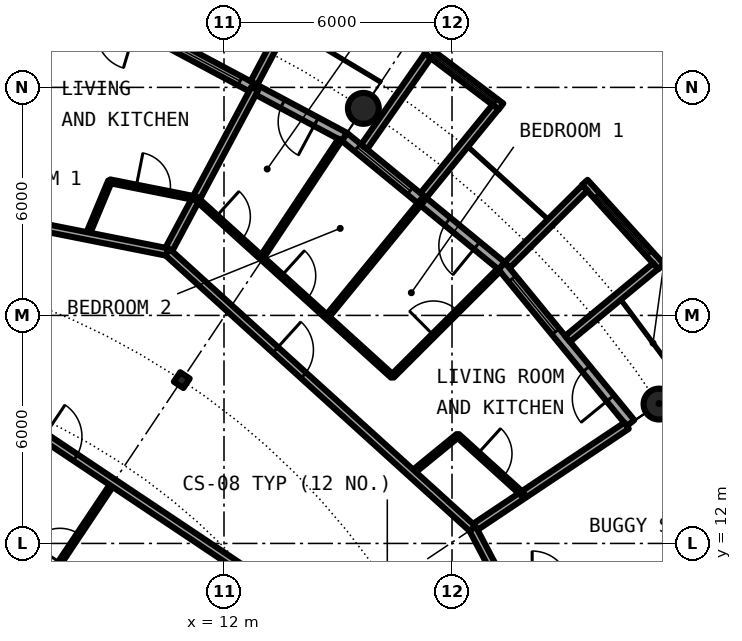
"""IFC4 building model, lengths in metres.
Left out: names, types, materials, properties, quantities, classifications, styles, units other than length and angle.
Written with IfcOpenShell. Run it as: python <this file> out.ifc"""

import sys

from ifc_helpers import new_model, si_unit, direction, frame, frame_2d, origin, origin_2d, place, context, subcontext, project, spatial, rectangle, circle, hollow_circle, i_section, extrude, element, fill, save


model = new_model("IFC4")
c1 = context("Model", 3, precision=1e-05, world=origin(), true_north=direction((0.0, 1.0)))
c2 = subcontext(c1, "Body", "Model", "MODEL_VIEW")
j1 = project(units=[si_unit("LENGTHUNIT", "METRE"), si_unit("PLANEANGLEUNIT", "RADIAN")], contexts=[c1])
p1 = place(None, origin())
s1 = spatial("IfcSite", under=j1, at=p1, CompositionType="ELEMENT")
p2 = place(p1, origin())
s2 = spatial("IfcBuilding", under=s1, at=p2, CompositionType="ELEMENT")
p3 = place(p2, frame((0.0, 0.0, 227.95)))
s3 = spatial("IfcBuildingStorey", under=s2, at=p3, CompositionType="ELEMENT", Elevation=227.95)
for number, where, z_axis, x_axis in (
    (1, (23.448, 15.667, 0.0), (0.0, 0.0, 1.0), (1.0, 0.0, 0.0)),
    (2, (15.667, 23.448, 0.0), (0.0, 0.0, 1.0), (1.0, 0.0, 0.0)),
):
    element("IfcColumn", number, at=place(p3, frame(where, z_axis=z_axis, x_axis=x_axis)), inside=s3, PredefinedType="COLUMN", context=c2, shape_type="SweptSolid", body=[
        extrude(hollow_circle(Radius=0.406, WallThickness=0.03, at=origin_2d()), origin(), (0.0, 0.0, 1.0), 3.05),
    ])
p4 = place(p3, frame((10.889, 16.297, 0.0), z_axis=(0.0, 0.0, 1.0), x_axis=(0.55557023302, 0.831469612303, 0.0)))
e3 = element("IfcColumn", 3, at=p4, inside=s3, PredefinedType="COLUMN", context=c2, shape_type="SweptSolid", body=[
    extrude(i_section(OverallWidth=0.3, OverallDepth=0.3, WebThickness=0.011, FlangeThickness=0.019, FilletRadius=0.027, at=origin_2d()), origin(), (0.0, 0.0, 1.0), 3.05),
])
p5 = place(p3, frame((22.699, 15.167, 0.0), z_axis=(0.0, 0.0, 1.0), x_axis=(-0.634382322723, 0.773019449054, 0.0)))
e4 = element("IfcWall", 4, at=p5, inside=s3, PredefinedType="SOLIDWALL", context=c2, shape_type="SweptSolid", body=[
    extrude(rectangle(XDim=5.352, YDim=0.25, at=frame_2d((2.676, 0.0))), origin(), (0.0, 0.0, 1.0), 2.7),
])
p6 = place(p5, frame((0.841, 0.0, 0.0)))
e5 = element("IfcOpeningElement", 5, at=p6, cuts=e4, PredefinedType="OPENING", context=c2, shape_type="SweptSolid", body=[
    extrude(rectangle(XDim=1.0, YDim=2.2, at=frame_2d((0.5, 1.1))), frame((0.0, 0.135, 0.0), z_axis=(0.0, -1.0, 0.0), x_axis=(1.0, 0.0, 0.0)), (0.0, 0.0, 1.0), 0.27),
])
p7 = place(p5, frame((3.111, 0.0, 0.3)))
e6 = element("IfcOpeningElement", 6, at=p7, cuts=e4, PredefinedType="OPENING", context=c2, shape_type="SweptSolid", body=[
    extrude(rectangle(XDim=1.8, YDim=2.1, at=frame_2d((0.9, 1.05))), frame((0.0, 0.135, 0.0), z_axis=(0.0, -1.0, 0.0), x_axis=(1.0, 0.0, 0.0)), (0.0, 0.0, 1.0), 0.27),
])
p8 = place(p3, frame((23.503, 19.282, -0.03), z_axis=(0.0, 0.0, 1.0), x_axis=(-0.671506829416, 0.740998365753, 0.0)))
e7 = element("IfcWall", 7, at=p8, inside=s3, PredefinedType="SOLIDWALL", context=c2, shape_type="SweptSolid", body=[
    extrude(rectangle(XDim=2.993, YDim=0.2, at=frame_2d((1.497, 0.0))), origin(), (0.0, 0.0, 1.0), 2.73),
])
p9 = place(p8, frame((0.457, 0.0, 0.33)))
e8 = element("IfcOpeningElement", 8, at=p9, cuts=e7, PredefinedType="OPENING", context=c2, shape_type="SweptSolid", body=[
    extrude(circle(Radius=1.04, at=frame_2d((1.04, 1.04))), frame((0.0, 0.11, 0.0), z_axis=(0.0, -1.0, 0.0), x_axis=(1.0, 0.0, 0.0)), (0.0, 0.0, 1.0), 0.22),
])
p10 = place(p3, frame((21.041, 17.384, -0.03), z_axis=(0.0, 0.0, 1.0), x_axis=(0.770784861449, 0.63709551667, 0.0)))
e9 = element("IfcWall", 9, at=p10, inside=s3, PredefinedType="SOLIDWALL", context=c2, shape_type="SweptSolid", body=[
    extrude(rectangle(XDim=3.006, YDim=0.2, at=frame_2d((1.503, 0.0))), origin(), (0.0, 0.0, 1.0), 2.73),
])
p11 = place(p3, frame((19.45, 19.323, -0.03), z_axis=(0.0, 0.0, 1.0), x_axis=(0.709727076896, 0.704476739375, 0.0)))
e10 = element("IfcWall", 10, at=p11, inside=s3, PredefinedType="SOLIDWALL", context=c2, shape_type="SweptSolid", body=[
    extrude(rectangle(XDim=2.883, YDim=0.2, at=frame_2d((1.441, 0.0))), origin(), (0.0, 0.0, 1.0), 2.73),
])
p12 = place(p3, frame((19.304, 19.304, 0.0), z_axis=(0.0, 0.0, 1.0), x_axis=(-0.773019449054, 0.634382322723, 0.0)))
e11 = element("IfcWall", 11, at=p12, inside=s3, PredefinedType="SOLIDWALL", context=c2, shape_type="SweptSolid", body=[
    extrude(rectangle(XDim=5.352, YDim=0.25, at=frame_2d((2.676, 0.0))), origin(), (0.0, 0.0, 1.0), 2.7),
])
p13 = place(p12, frame((0.841, 0.0, 0.0)))
e12 = element("IfcOpeningElement", 12, at=p13, cuts=e11, PredefinedType="OPENING", context=c2, shape_type="SweptSolid", body=[
    extrude(rectangle(XDim=1.0, YDim=2.2, at=frame_2d((0.5, 1.1))), frame((0.0, 0.135, 0.0), z_axis=(0.0, -1.0, 0.0), x_axis=(1.0, 0.0, 0.0)), (0.0, 0.0, 1.0), 0.27),
])
p14 = place(p12, frame((3.111, 0.0, 0.3)))
e13 = element("IfcOpeningElement", 13, at=p14, cuts=e11, PredefinedType="OPENING", context=c2, shape_type="SweptSolid", body=[
    extrude(rectangle(XDim=1.8, YDim=2.1, at=frame_2d((0.9, 1.05))), frame((0.0, 0.135, 0.0), z_axis=(0.0, -1.0, 0.0), x_axis=(1.0, 0.0, 0.0)), (0.0, 0.0, 1.0), 0.27),
])
p15 = place(p3, frame((19.289, 23.497, -0.03), z_axis=(0.0, 0.0, 1.0), x_axis=(-0.797887588059, 0.602806268067, 0.0)))
e14 = element("IfcWall", 14, at=p15, inside=s3, PredefinedType="SOLIDWALL", context=c2, shape_type="SweptSolid", body=[
    extrude(rectangle(XDim=2.447, YDim=0.2, at=frame_2d((1.223, 0.0))), origin(), (0.0, 0.0, 1.0), 2.73),
])
p16 = place(p15, frame((0.183, 0.0, 0.33)))
e15 = element("IfcOpeningElement", 15, at=p16, cuts=e14, PredefinedType="OPENING", context=c2, shape_type="SweptSolid", body=[
    extrude(circle(Radius=1.04, at=frame_2d((1.04, 1.04))), frame((0.0, 0.11, 0.0), z_axis=(0.0, -1.0, 0.0), x_axis=(1.0, 0.0, 0.0)), (0.0, 0.0, 1.0), 0.22),
])
p17 = place(p3, frame((17.246, 21.155, -0.03), z_axis=(0.0, 0.0, 1.0), x_axis=(0.631741648902, 0.775179004516, 0.0)))
e16 = element("IfcWall", 16, at=p17, inside=s3, PredefinedType="SOLIDWALL", context=c2, shape_type="SweptSolid", body=[
    extrude(rectangle(XDim=3.006, YDim=0.2, at=frame_2d((1.503, 0.0))), origin(), (0.0, 0.0, 1.0), 2.73),
])
p18 = place(p3, frame((15.688, 22.433, -0.03), z_axis=(0.0, 0.0, 1.0), x_axis=(0.573260687834, 0.819373043115, 0.0)))
e17 = element("IfcWall", 17, at=p18, inside=s3, PredefinedType="SOLIDWALL", context=c2, shape_type="SweptSolid", body=[
    extrude(rectangle(XDim=2.925, YDim=0.2, at=frame_2d((1.463, 0.0))), origin(), (0.0, 0.0, 1.0), 2.73),
])
p19 = place(p3, frame((15.167, 22.699, 0.0), z_axis=(0.0, 0.0, 1.0), x_axis=(-0.881915646801, 0.471407246368, 0.0)))
e18 = element("IfcWall", 18, at=p19, inside=s3, PredefinedType="SOLIDWALL", context=c2, shape_type="SweptSolid", body=[
    extrude(rectangle(XDim=5.352, YDim=0.25, at=frame_2d((2.676, 0.0))), origin(), (0.0, 0.0, 1.0), 2.7),
])
p20 = place(p19, frame((0.841, 0.0, 0.0)))
e19 = element("IfcOpeningElement", 19, at=p20, cuts=e18, PredefinedType="OPENING", context=c2, shape_type="SweptSolid", body=[
    extrude(rectangle(XDim=1.0, YDim=2.2, at=frame_2d((0.5, 1.1))), frame((0.0, 0.135, 0.0), z_axis=(0.0, -1.0, 0.0), x_axis=(1.0, 0.0, 0.0)), (0.0, 0.0, 1.0), 0.27),
])
p21 = place(p19, frame((3.111, 0.0, 0.3)))
e20 = element("IfcOpeningElement", 20, at=p21, cuts=e18, PredefinedType="OPENING", context=c2, shape_type="SweptSolid", body=[
    extrude(rectangle(XDim=1.8, YDim=2.1, at=frame_2d((0.9, 1.05))), frame((0.0, 0.135, 0.0), z_axis=(0.0, -1.0, 0.0), x_axis=(1.0, 0.0, 0.0)), (0.0, 0.0, 1.0), 0.27),
])
p22 = place(p3, frame((12.787, 24.113, -0.03), z_axis=(0.0, 0.0, 1.0), x_axis=(0.468365282436, 0.883534924159, 0.0)))
e21 = element("IfcWall", 21, at=p22, inside=s3, PredefinedType="SOLIDWALL", context=c2, shape_type="SweptSolid", body=[
    extrude(rectangle(XDim=3.006, YDim=0.2, at=frame_2d((1.503, 0.0))), origin(), (0.0, 0.0, 1.0), 2.73),
])
p23 = place(p3, frame((6.78, 10.147, 0.0), z_axis=(0.0, 0.0, 1.0), x_axis=(0.555528237031, 0.831497671591, 0.0)))
e22 = element("IfcWall", 22, at=p23, inside=s3, PredefinedType="PARTITIONING", context=c2, shape_type="SweptSolid", body=[
    extrude(rectangle(XDim=4.149, YDim=0.1, at=frame_2d((2.075, 0.0))), origin(), (0.0, 0.0, 1.0), 2.7),
])
p24 = place(p23, frame((1.625, 0.0, 0.0)))
e23 = element("IfcOpeningElement", 23, at=p24, cuts=e22, PredefinedType="OPENING", context=c2, shape_type="SweptSolid", body=[
    extrude(rectangle(XDim=0.9, YDim=2.3, at=frame_2d((0.45, 1.15))), frame((0.0, 0.06, 0.0), z_axis=(0.0, -1.0, 0.0), x_axis=(1.0, 0.0, 0.0)), (0.0, 0.0, 1.0), 0.12),
])
p25 = place(p3, frame((8.396, 20.088, 0.0), z_axis=(0.0, 0.0, 1.0), x_axis=(0.385469858593, 0.922720427929, 0.0)))
e24 = element("IfcWall", 24, at=p25, inside=s3, PredefinedType="PARTITIONING", context=c2, shape_type="SweptSolid", body=[
    extrude(rectangle(XDim=1.562, YDim=0.1, at=frame_2d((0.781, 0.0))), origin(), (0.0, 0.0, 1.0), 2.7),
])
p26 = place(p3, frame((10.512, 19.667, 0.0), z_axis=(0.0, 0.0, 1.0), x_axis=(0.471271812246, 0.881988026553, 0.0)))
e25 = element("IfcWall", 25, at=p26, inside=s3, PredefinedType="PARTITIONING", context=c2, shape_type="SweptSolid", body=[
    extrude(rectangle(XDim=4.874, YDim=0.2, at=frame_2d((2.437, 0.0))), origin(), (0.0, 0.0, 1.0), 2.7),
])
p27 = place(p3, frame((12.988, 19.518, 0.0), z_axis=(0.0, 0.0, 1.0), x_axis=(0.553823887887, 0.83263383381, 0.0)))
e26 = element("IfcWall", 26, at=p27, inside=s3, PredefinedType="PARTITIONING", context=c2, shape_type="SweptSolid", body=[
    extrude(rectangle(XDim=3.73, YDim=0.1, at=frame_2d((1.865, 0.0))), origin(), (0.0, 0.0, 1.0), 2.7),
])
p28 = place(p3, frame((14.709, 17.958, 0.0), z_axis=(0.0, 0.0, 1.0), x_axis=(0.633590098448, 0.773668913133, 0.0)))
e27 = element("IfcWall", 27, at=p28, inside=s3, PredefinedType="PARTITIONING", context=c2, shape_type="SweptSolid", body=[
    extrude(rectangle(XDim=3.962, YDim=0.1, at=frame_2d((1.981, 0.0))), origin(), (0.0, 0.0, 1.0), 2.7),
])
p29 = place(p3, frame((16.43, 16.398, 0.0), z_axis=(0.0, 0.0, 1.0), x_axis=(0.707722727509, 0.706490297858, 0.0)))
e28 = element("IfcWall", 28, at=p29, inside=s3, PredefinedType="PARTITIONING", context=c2, shape_type="SweptSolid", body=[
    extrude(rectangle(XDim=3.962, YDim=0.1, at=frame_2d((1.981, 0.0))), origin(), (0.0, 0.0, 1.0), 2.7),
])
p30 = place(p29, frame((1.531, 0.0, 0.0)))
e29 = element("IfcOpeningElement", 29, at=p30, cuts=e28, PredefinedType="OPENING", context=c2, shape_type="SweptSolid", body=[
    extrude(rectangle(XDim=0.9, YDim=2.3, at=frame_2d((0.45, 1.15))), frame((0.0, 0.06, 0.0), z_axis=(0.0, -1.0, 0.0), x_axis=(1.0, 0.0, 0.0)), (0.0, 0.0, 1.0), 0.12),
])
p31 = place(p3, frame((16.936, 13.845, 0.0), z_axis=(0.0, 0.0, 1.0), x_axis=(0.774283039722, 0.632839453889, 0.0)))
e30 = element("IfcWall", 30, at=p31, inside=s3, PredefinedType="PARTITIONING", context=c2, shape_type="SweptSolid", body=[
    extrude(rectangle(XDim=1.569, YDim=0.1, at=frame_2d((0.785, 0.0))), origin(), (0.0, 0.0, 1.0), 2.7),
])
p32 = place(p3, frame((18.542, 12.389, 0.0), z_axis=(0.0, 0.0, 1.0), x_axis=(0.831387096605, 0.55569370664, 0.0)))
e31 = element("IfcWall", 31, at=p32, inside=s3, PredefinedType="PARTITIONING", context=c2, shape_type="SweptSolid", body=[
    extrude(rectangle(XDim=4.875, YDim=0.2, at=frame_2d((2.438, 0.0))), origin(), (0.0, 0.0, 1.0), 2.7),
])
p33 = place(p3, frame((3.453, 17.36, 0.0), z_axis=(0.0, 0.0, 1.0), x_axis=(0.831437137577, -0.555618831806, 0.0)))
e32 = element("IfcWall", 32, at=p33, inside=s3, PredefinedType="PARTITIONING", context=c2, shape_type="SweptSolid", body=[
    extrude(rectangle(XDim=13.549, YDim=0.2, at=frame_2d((6.774, 0.0))), origin(), (0.0, 0.0, 1.0), 2.7),
])
p34 = place(p33, frame((4.581, 0.0, 0.0)))
e33 = element("IfcOpeningElement", 33, at=p34, cuts=e32, PredefinedType="OPENING", context=c2, shape_type="SweptSolid", body=[
    extrude(rectangle(XDim=1.0, YDim=2.3, at=frame_2d((0.5, 1.15))), frame((0.0, 0.11, 0.0), z_axis=(0.0, -1.0, 0.0), x_axis=(1.0, 0.0, 0.0)), (0.0, 0.0, 1.0), 0.22),
])
p35 = place(p3, frame((-2.186, 22.193, 0.0), z_axis=(0.0, 0.0, 1.0), x_axis=(0.980780341017, -0.195115152343, 0.0)))
e34 = element("IfcWall", 34, at=p35, inside=s3, PredefinedType="PARTITIONING", context=c2, shape_type="SweptSolid", body=[
    extrude(rectangle(XDim=12.947, YDim=0.2, at=frame_2d((6.473, 0.0))), origin(), (0.0, 0.0, 1.0), 2.7),
])
p36 = place(p35, frame((4.895, 0.0, 0.0)))
e35 = element("IfcOpeningElement", 35, at=p36, cuts=e34, PredefinedType="OPENING", context=c2, shape_type="SweptSolid", body=[
    extrude(rectangle(XDim=1.0, YDim=2.3, at=frame_2d((0.5, 1.15))), frame((0.0, 0.11, 0.0), z_axis=(0.0, -1.0, 0.0), x_axis=(1.0, 0.0, 0.0)), (0.0, 0.0, 1.0), 0.22),
])
p37 = place(p3, frame((10.512, 19.667, 0.0), z_axis=(0.0, 0.0, 1.0), x_axis=(0.740947367223, -0.671563101283, 0.0)))
e36 = element("IfcWall", 36, at=p37, inside=s3, PredefinedType="PARTITIONING", context=c2, shape_type="SweptSolid", body=[
    extrude(rectangle(XDim=10.837, YDim=0.2, at=frame_2d((5.419, 0.0))), origin(), (0.0, 0.0, 1.0), 2.7),
])
p38 = place(p37, frame((3.835, 0.0, 0.0)))
e37 = element("IfcOpeningElement", 37, at=p38, cuts=e36, PredefinedType="OPENING", context=c2, shape_type="SweptSolid", body=[
    extrude(rectangle(XDim=1.0, YDim=2.3, at=frame_2d((0.5, 1.15))), frame((0.0, 0.11, 0.0), z_axis=(0.0, -1.0, 0.0), x_axis=(1.0, 0.0, 0.0)), (0.0, 0.0, 1.0), 0.22),
])
p39 = place(p3, frame((18.542, 12.389, 0.0), z_axis=(0.0, 0.0, 1.0), x_axis=(0.465812036273, -0.88488369115, 0.0)))
e38 = element("IfcWall", 38, at=p39, inside=s3, PredefinedType="PARTITIONING", context=c2, shape_type="SweptSolid", body=[
    extrude(rectangle(XDim=1.687, YDim=0.2, at=frame_2d((0.844, 0.0))), origin(), (0.0, 0.0, 1.0), 2.7),
])
p40 = place(p3, frame((8.998, 21.529, 0.0), z_axis=(0.0, 0.0, 1.0), x_axis=(0.980783177308, -0.19510089469, 0.0)))
e39 = element("IfcWall", 39, at=p40, inside=s3, PredefinedType="PARTITIONING", context=c2, shape_type="SweptSolid", body=[
    extrude(rectangle(XDim=2.312, YDim=0.1, at=frame_2d((1.156, 0.0))), origin(), (0.0, 0.0, 1.0), 2.7),
])
p41 = place(p40, frame((0.706, 0.0, 0.0)))
e40 = element("IfcOpeningElement", 40, at=p41, cuts=e39, PredefinedType="OPENING", context=c2, shape_type="SweptSolid", body=[
    extrude(rectangle(XDim=0.9, YDim=2.3, at=frame_2d((0.45, 1.15))), frame((0.0, 0.06, 0.0), z_axis=(0.0, -1.0, 0.0), x_axis=(1.0, 0.0, 0.0)), (0.0, 0.0, 1.0), 0.12),
])
p42 = place(p3, frame((11.266, 21.078, 0.0), z_axis=(0.0, 0.0, 1.0), x_axis=(0.74097115376, -0.671536856245, 0.0)))
e41 = element("IfcWall", 41, at=p42, inside=s3, PredefinedType="PARTITIONING", context=c2, shape_type="SweptSolid", body=[
    extrude(rectangle(XDim=6.969, YDim=0.1, at=frame_2d((3.484, 0.0))), origin(), (0.0, 0.0, 1.0), 2.7),
])
p43 = place(p42, frame((3.034, 0.0, 0.0)))
e42 = element("IfcOpeningElement", 42, at=p43, cuts=e41, PredefinedType="OPENING", context=c2, shape_type="SweptSolid", body=[
    extrude(rectangle(XDim=0.9, YDim=2.3, at=frame_2d((0.45, 1.15))), frame((0.0, 0.06, 0.0), z_axis=(0.0, -1.0, 0.0), x_axis=(1.0, 0.0, 0.0)), (0.0, 0.0, 1.0), 0.12),
])
p44 = place(p42, frame((0.712, 0.0, 0.0)))
e43 = element("IfcOpeningElement", 43, at=p44, cuts=e41, PredefinedType="OPENING", context=c2, shape_type="SweptSolid", body=[
    extrude(rectangle(XDim=0.9, YDim=2.3, at=frame_2d((0.45, 1.15))), frame((0.0, 0.06, 0.0), z_axis=(0.0, -1.0, 0.0), x_axis=(1.0, 0.0, 0.0)), (0.0, 0.0, 1.0), 0.12),
])
p45 = place(p3, frame((18.149, 14.84, 0.0), z_axis=(0.0, 0.0, 1.0), x_axis=(0.741127434804, -0.671364376014, 0.0)))
e44 = element("IfcWall", 44, at=p45, inside=s3, PredefinedType="PARTITIONING", context=c2, shape_type="SweptSolid", body=[
    extrude(rectangle(XDim=2.324, YDim=0.1, at=frame_2d((1.162, 0.0))), origin(), (0.0, 0.0, 1.0), 2.7),
])
p46 = place(p45, frame((0.714, 0.0, 0.0)))
e45 = element("IfcOpeningElement", 45, at=p46, cuts=e44, PredefinedType="OPENING", context=c2, shape_type="SweptSolid", body=[
    extrude(rectangle(XDim=0.9, YDim=2.3, at=frame_2d((0.45, 1.15))), frame((0.0, 0.06, 0.0), z_axis=(0.0, -1.0, 0.0), x_axis=(1.0, 0.0, 0.0)), (0.0, 0.0, 1.0), 0.12),
])
p47 = place(p6, origin())
e46 = element("IfcDoor", 46, at=p47, inside=s3, OperationType="SINGLE_SWING_LEFT", PredefinedType="DOOR", context=c2, shape_type="SweptSolid", body=[
    extrude(rectangle(XDim=1.0, YDim=2.2, at=frame_2d((0.5, 1.1))), frame((0.0, 0.025, 0.0), z_axis=(0.0, -1.0, 0.0), x_axis=(1.0, 0.0, 0.0)), (0.0, 0.0, 1.0), 0.05),
])
fill(e5, e46)
p48 = place(p7, origin())
e47 = element("IfcWindow", 47, at=p48, inside=s3, PartitioningType="SINGLE_PANEL", PredefinedType="WINDOW", context=c2, shape_type="SweptSolid", body=[
    extrude(rectangle(XDim=1.8, YDim=2.1, at=frame_2d((0.9, 1.05))), frame((0.0, 0.03, 0.0), z_axis=(0.0, -1.0, 0.0), x_axis=(1.0, 0.0, 0.0)), (0.0, 0.0, 1.0), 0.06),
])
fill(e6, e47)
p49 = place(p9, origin())
e48 = element("IfcWindow", 48, at=p49, inside=s3, PartitioningType="SINGLE_PANEL", PredefinedType="WINDOW", context=c2, shape_type="SweptSolid", body=[
    extrude(circle(Radius=1.04, at=frame_2d((1.04, 1.04))), frame((0.0, 0.03, 0.0), z_axis=(0.0, -1.0, 0.0), x_axis=(1.0, 0.0, 0.0)), (0.0, 0.0, 1.0), 0.06),
])
fill(e8, e48)
p50 = place(p13, origin())
e49 = element("IfcDoor", 49, at=p50, inside=s3, OperationType="SINGLE_SWING_LEFT", PredefinedType="DOOR", context=c2, shape_type="SweptSolid", body=[
    extrude(rectangle(XDim=1.0, YDim=2.2, at=frame_2d((0.5, 1.1))), frame((0.0, 0.025, 0.0), z_axis=(0.0, -1.0, 0.0), x_axis=(1.0, 0.0, 0.0)), (0.0, 0.0, 1.0), 0.05),
])
fill(e12, e49)
p51 = place(p14, origin())
e50 = element("IfcWindow", 50, at=p51, inside=s3, PartitioningType="SINGLE_PANEL", PredefinedType="WINDOW", context=c2, shape_type="SweptSolid", body=[
    extrude(rectangle(XDim=1.8, YDim=2.1, at=frame_2d((0.9, 1.05))), frame((0.0, 0.03, 0.0), z_axis=(0.0, -1.0, 0.0), x_axis=(1.0, 0.0, 0.0)), (0.0, 0.0, 1.0), 0.06),
])
fill(e13, e50)
p52 = place(p16, origin())
e51 = element("IfcWindow", 51, at=p52, inside=s3, PartitioningType="SINGLE_PANEL", PredefinedType="WINDOW", context=c2, shape_type="SweptSolid", body=[
    extrude(circle(Radius=1.04, at=frame_2d((1.04, 1.04))), frame((0.0, 0.03, 0.0), z_axis=(0.0, -1.0, 0.0), x_axis=(1.0, 0.0, 0.0)), (0.0, 0.0, 1.0), 0.06),
])
fill(e15, e51)
p53 = place(p20, origin())
e52 = element("IfcDoor", 52, at=p53, inside=s3, OperationType="SINGLE_SWING_LEFT", PredefinedType="DOOR", context=c2, shape_type="SweptSolid", body=[
    extrude(rectangle(XDim=1.0, YDim=2.2, at=frame_2d((0.5, 1.1))), frame((0.0, 0.025, 0.0), z_axis=(0.0, -1.0, 0.0), x_axis=(1.0, 0.0, 0.0)), (0.0, 0.0, 1.0), 0.05),
])
fill(e19, e52)
p54 = place(p21, origin())
e53 = element("IfcWindow", 53, at=p54, inside=s3, PartitioningType="SINGLE_PANEL", PredefinedType="WINDOW", context=c2, shape_type="SweptSolid", body=[
    extrude(rectangle(XDim=1.8, YDim=2.1, at=frame_2d((0.9, 1.05))), frame((0.0, 0.03, 0.0), z_axis=(0.0, -1.0, 0.0), x_axis=(1.0, 0.0, 0.0)), (0.0, 0.0, 1.0), 0.06),
])
fill(e20, e53)
p55 = place(p38, origin())
e54 = element("IfcDoor", 54, at=p55, inside=s3, OperationType="SINGLE_SWING_LEFT", PredefinedType="DOOR", context=c2, shape_type="SweptSolid", body=[
    extrude(rectangle(XDim=1.0, YDim=2.3, at=frame_2d((0.5, 1.15))), frame((0.0, 0.025, 0.0), z_axis=(0.0, -1.0, 0.0), x_axis=(1.0, 0.0, 0.0)), (0.0, 0.0, 1.0), 0.05),
])
fill(e37, e54)
p56 = place(p46, origin())
e55 = element("IfcDoor", 55, at=p56, inside=s3, OperationType="SINGLE_SWING_RIGHT", PredefinedType="DOOR", context=c2, shape_type="SweptSolid", body=[
    extrude(rectangle(XDim=0.9, YDim=2.3, at=frame_2d((0.45, 1.15))), frame((0.0, 0.025, 0.0), z_axis=(0.0, -1.0, 0.0), x_axis=(1.0, 0.0, 0.0)), (0.0, 0.0, 1.0), 0.05),
])
fill(e45, e55)
p57 = place(p30, origin())
e56 = element("IfcDoor", 56, at=p57, inside=s3, OperationType="SINGLE_SWING_RIGHT", PredefinedType="DOOR", context=c2, shape_type="SweptSolid", body=[
    extrude(rectangle(XDim=0.9, YDim=2.3, at=frame_2d((0.45, 1.15))), frame((0.0, 0.025, 0.0), z_axis=(0.0, -1.0, 0.0), x_axis=(1.0, 0.0, 0.0)), (0.0, 0.0, 1.0), 0.05),
])
fill(e29, e56)
p58 = place(p43, origin())
e57 = element("IfcDoor", 57, at=p58, inside=s3, OperationType="SINGLE_SWING_LEFT", PredefinedType="DOOR", context=c2, shape_type="SweptSolid", body=[
    extrude(rectangle(XDim=0.9, YDim=2.3, at=frame_2d((0.45, 1.15))), frame((0.0, 0.025, 0.0), z_axis=(0.0, -1.0, 0.0), x_axis=(1.0, 0.0, 0.0)), (0.0, 0.0, 1.0), 0.05),
])
fill(e42, e57)
p59 = place(p44, origin())
e58 = element("IfcDoor", 58, at=p59, inside=s3, OperationType="SINGLE_SWING_LEFT", PredefinedType="DOOR", context=c2, shape_type="SweptSolid", body=[
    extrude(rectangle(XDim=0.9, YDim=2.3, at=frame_2d((0.45, 1.15))), frame((0.0, 0.025, 0.0), z_axis=(0.0, -1.0, 0.0), x_axis=(1.0, 0.0, 0.0)), (0.0, 0.0, 1.0), 0.05),
])
fill(e43, e58)
p60 = place(p41, origin())
e59 = element("IfcDoor", 59, at=p60, inside=s3, OperationType="SINGLE_SWING_RIGHT", PredefinedType="DOOR", context=c2, shape_type="SweptSolid", body=[
    extrude(rectangle(XDim=0.9, YDim=2.3, at=frame_2d((0.45, 1.15))), frame((0.0, 0.025, 0.0), z_axis=(0.0, -1.0, 0.0), x_axis=(1.0, 0.0, 0.0)), (0.0, 0.0, 1.0), 0.05),
])
fill(e40, e59)
p61 = place(p34, origin())
e60 = element("IfcDoor", 60, at=p61, inside=s3, OperationType="SINGLE_SWING_LEFT", PredefinedType="DOOR", context=c2, shape_type="SweptSolid", body=[
    extrude(rectangle(XDim=1.0, YDim=2.3, at=frame_2d((0.5, 1.15))), frame((0.0, 0.025, 0.0), z_axis=(0.0, -1.0, 0.0), x_axis=(1.0, 0.0, 0.0)), (0.0, 0.0, 1.0), 0.05),
])
fill(e33, e60)
p62 = place(p24, origin())
e61 = element("IfcDoor", 61, at=p62, inside=s3, OperationType="SINGLE_SWING_RIGHT", PredefinedType="DOOR", context=c2, shape_type="SweptSolid", body=[
    extrude(rectangle(XDim=0.9, YDim=2.3, at=frame_2d((0.45, 1.15))), frame((0.0, 0.025, 0.0), z_axis=(0.0, -1.0, 0.0), x_axis=(1.0, 0.0, 0.0)), (0.0, 0.0, 1.0), 0.05),
])
fill(e23, e61)
save(model, sys.argv[1])
